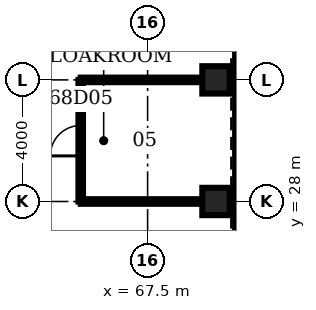
"""IFC4 building model, lengths in metres.
Left out: names, types, materials, properties, quantities, classifications, styles, units other than length and angle.
Written with IfcOpenShell. Run it as: python <this file> out.ifc"""

import sys

from ifc_helpers import new_model, si_unit, direction, frame, frame_2d, origin, origin_2d, place, context, subcontext, project, spatial, rectangle, hollow_rectangle, extrude, element, fill, save


model = new_model("IFC4")
c1 = context("Model", 3, precision=1e-05, world=origin(), true_north=direction((0.0, 1.0)))
c2 = subcontext(c1, "Body", "Model", "MODEL_VIEW")
j1 = project(units=[si_unit("LENGTHUNIT", "METRE"), si_unit("PLANEANGLEUNIT", "RADIAN")], contexts=[c1])
p1 = place(None, origin())
s1 = spatial("IfcSite", under=j1, at=p1, CompositionType="ELEMENT")
p2 = place(p1, origin())
s2 = spatial("IfcBuilding", under=s1, at=p2, CompositionType="ELEMENT")
p3 = place(p2, frame((0.0, 0.0, 300.5)))
s3 = spatial("IfcBuildingStorey", under=s2, at=p3, CompositionType="ELEMENT", Elevation=300.5)
for number, where, z_axis, x_axis in (
    (1, (69.75, 28.0, 0.0), (0.0, 0.0, 1.0), (1.0, 0.0, 0.0)),
    (2, (69.75, 32.0, 0.0), (0.0, 0.0, 1.0), (1.0, 0.0, 0.0)),
):
    element("IfcColumn", number, at=place(p3, frame(where, z_axis=z_axis, x_axis=x_axis)), inside=s3, PredefinedType="COLUMN", context=c2, shape_type="SweptSolid", body=[
        extrude(hollow_rectangle(XDim=0.9, YDim=0.9, WallThickness=0.06, at=origin_2d()), origin(), (0.0, 0.0, 1.0), 4.2),
    ])
for number, where, z_axis, x_axis in (
    (3, (65.3, 28.0, 0.0), (0.0, 0.0, 1.0), (1.0, 0.0, 0.0)),
    (4, (65.3, 32.0, 0.0), (0.0, 0.0, 1.0), (1.0, 0.0, 0.0)),
):
    element("IfcWall", number, at=place(p3, frame(where, z_axis=z_axis, x_axis=x_axis)), inside=s3, PredefinedType="PARTITIONING", context=c2, shape_type="SweptSolid", body=[
        extrude(rectangle(XDim=4.0, YDim=0.15, at=frame_2d((2.0, 0.0))), origin(), (0.0, 0.0, 1.0), 3.0),
    ])
p4 = place(p3, frame((65.3, 28.0, 0.0), z_axis=(0.0, 0.0, 1.0), x_axis=(0.0, 1.0, 0.0)))
e5 = element("IfcWall", 5, at=p4, inside=s3, PredefinedType="PARTITIONING", context=c2, shape_type="SweptSolid", body=[
    extrude(rectangle(XDim=4.0, YDim=0.15, at=frame_2d((2.0, 0.0))), origin(), (0.0, 0.0, 1.0), 3.0),
])
p5 = place(p4, frame((1.5, 0.0, 0.0)))
e6 = element("IfcOpeningElement", 6, at=p5, cuts=e5, PredefinedType="OPENING", context=c2, shape_type="SweptSolid", body=[
    extrude(rectangle(XDim=1.0, YDim=2.1, at=frame_2d((0.5, 1.05))), frame((0.0, 0.085, 0.0), z_axis=(0.0, -1.0, 0.0), x_axis=(1.0, 0.0, 0.0)), (0.0, 0.0, 1.0), 0.17),
])
p6 = place(p5, origin())
e7 = element("IfcDoor", 7, at=p6, inside=s3, OperationType="SINGLE_SWING_LEFT", PredefinedType="DOOR", context=c2, shape_type="SweptSolid", body=[
    extrude(rectangle(XDim=1.0, YDim=2.1, at=frame_2d((0.5, 1.05))), frame((0.0, 0.025, 0.0), z_axis=(0.0, -1.0, 0.0), x_axis=(1.0, 0.0, 0.0)), (0.0, 0.0, 1.0), 0.05),
])
fill(e6, e7)
save(model, sys.argv[1])
